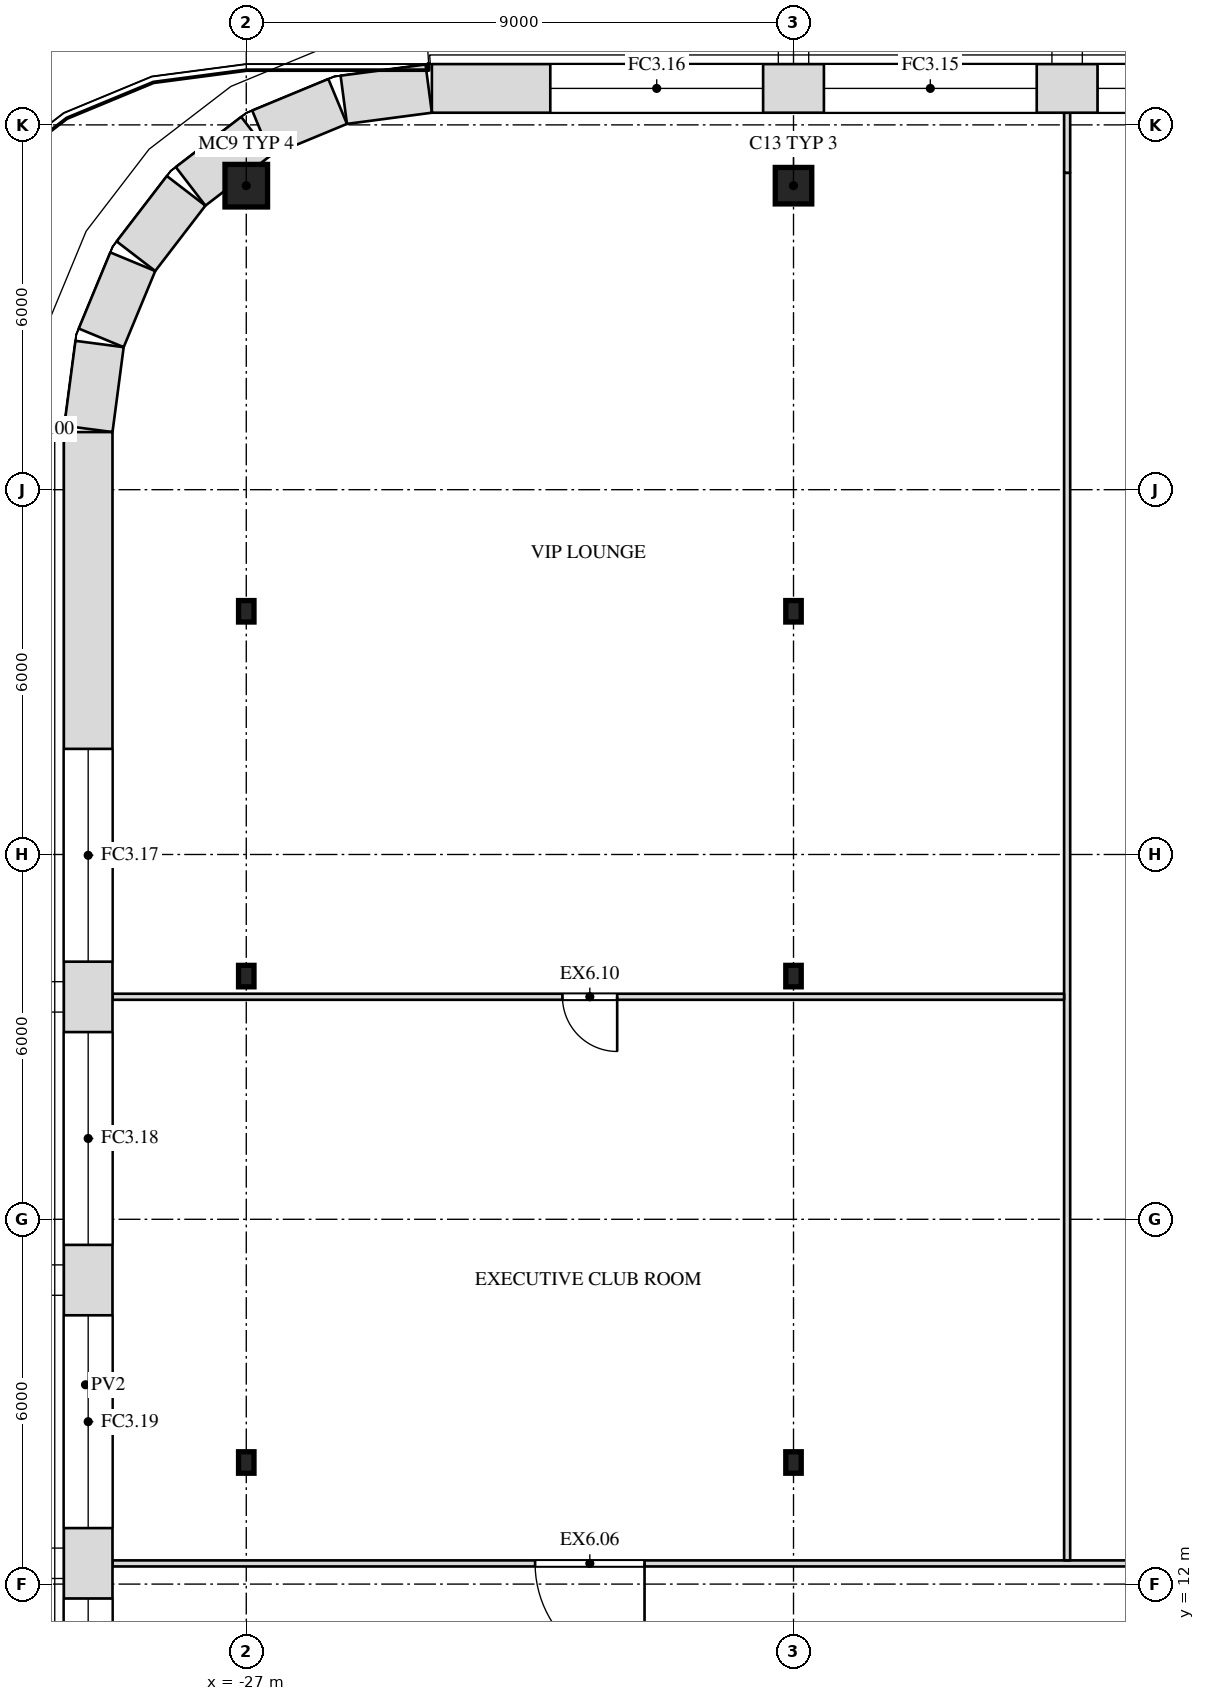
"""IFC4 building model, lengths in metres.
Left out: names, types, materials, properties, quantities, classifications, styles, units other than length and angle.
Written with IfcOpenShell. Run it as: python <this file> out.ifc"""

import sys

from ifc_helpers import new_model, si_unit, direction, frame, frame_2d, origin, origin_2d, place, context, subcontext, project, spatial, rectangle, i_section, extrude, element, fill, save


model = new_model("IFC4")
c1 = context("Model", 3, precision=1e-05, world=origin(), true_north=direction((0.0, 1.0)))
c2 = subcontext(c1, "Body", "Model", "MODEL_VIEW")
j1 = project(units=[si_unit("LENGTHUNIT", "METRE"), si_unit("PLANEANGLEUNIT", "RADIAN")], contexts=[c1])
p1 = place(None, origin())
s1 = spatial("IfcSite", under=j1, at=p1, CompositionType="ELEMENT")
p2 = place(p1, origin())
s2 = spatial("IfcBuilding", under=s1, at=p2, CompositionType="ELEMENT")
p3 = place(p2, frame((0.0, 0.0, 292.5)))
s3 = spatial("IfcBuildingStorey", under=s2, at=p3, CompositionType="ELEMENT", Elevation=292.5)
for number, where, z_axis, x_axis in (
    (1, (-27.0, 14.0, 0.0), (0.0, 0.0, 1.0), (1.0, 0.0, 0.0)),
    (2, (-18.0, 14.0, 0.0), (0.0, 0.0, 1.0), (1.0, 0.0, 0.0)),
    (3, (-27.0, 22.0, 0.0), (0.0, 0.0, 1.0), (1.0, 0.0, 0.0)),
    (4, (-18.0, 22.0, 0.0), (0.0, 0.0, 1.0), (1.0, 0.0, 0.0)),
    (5, (-27.0, 28.0, 0.0), (0.0, 0.0, 1.0), (1.0, 0.0, 0.0)),
    (6, (-18.0, 28.0, 0.0), (0.0, 0.0, 1.0), (1.0, 0.0, 0.0)),
):
    element("IfcColumn", number, at=place(p3, frame(where, z_axis=z_axis, x_axis=x_axis)), inside=s3, PredefinedType="COLUMN", context=c2, shape_type="SweptSolid", body=[
        extrude(i_section(OverallWidth=0.254, OverallDepth=0.353, WebThickness=0.01, FlangeThickness=0.016, at=origin_2d()), origin(), (0.0, 0.0, 1.0), 4.0),
    ])
p4 = place(p3, frame((-27.0, 35.0, 0.0), z_axis=(0.0, 0.0, 1.0), x_axis=(1.0, 0.0, 0.0)))
e7 = element("IfcColumn", 7, at=p4, inside=s3, PredefinedType="COLUMN", context=c2, shape_type="SweptSolid", body=[
    extrude(rectangle(XDim=0.7, YDim=0.7, at=origin_2d()), origin(), (0.0, 0.0, 1.0), 4.0),
])
p5 = place(p3, frame((-18.0, 35.0, 0.0), z_axis=(0.0, 0.0, 1.0), x_axis=(1.0, 0.0, 0.0)))
e8 = element("IfcColumn", 8, at=p5, inside=s3, PredefinedType="COLUMN", context=c2, shape_type="SweptSolid", body=[
    extrude(rectangle(XDim=0.6, YDim=0.6, at=origin_2d()), origin(), (0.0, 0.0, 1.0), 4.0),
])
p6 = place(p3, frame((-29.2, 12.34, 0.0), z_axis=(0.0, 0.0, 1.0), x_axis=(1.0, 0.0, 0.0)))
e9 = element("IfcWall", 9, at=p6, inside=s3, PredefinedType="PARTITIONING", context=c2, shape_type="SweptSolid", body=[
    extrude(rectangle(XDim=58.4, YDim=0.1, at=frame_2d((29.2, 0.0))), origin(), (0.0, 0.0, 1.0), 3.6),
])
p7 = place(p6, frame((6.95, 0.0, 0.0)))
e10 = element("IfcOpeningElement", 10, at=p7, cuts=e9, PredefinedType="OPENING", context=c2, shape_type="SweptSolid", body=[
    extrude(rectangle(XDim=1.8, YDim=2.1, at=frame_2d((0.9, 1.05))), frame((0.0, 0.062, 0.0), z_axis=(0.0, -1.0, 0.0), x_axis=(1.0, 0.0, 0.0)), (0.0, 0.0, 1.0), 0.124),
])
p8 = place(p6, frame((24.2, 0.0, 0.0)))
e11 = element("IfcOpeningElement", 11, at=p8, cuts=e9, PredefinedType="OPENING", context=c2, shape_type="SweptSolid", body=[
    extrude(rectangle(XDim=2.0, YDim=2.4, at=frame_2d((1.0, 1.2))), frame((0.0, 0.062, 0.0), z_axis=(0.0, -1.0, 0.0), x_axis=(1.0, 0.0, 0.0)), (0.0, 0.0, 1.0), 0.124),
])
p9 = place(p6, frame((32.2, 0.0, 0.0)))
e12 = element("IfcOpeningElement", 12, at=p9, cuts=e9, PredefinedType="OPENING", context=c2, shape_type="SweptSolid", body=[
    extrude(rectangle(XDim=2.0, YDim=2.4, at=frame_2d((1.0, 1.2))), frame((0.0, 0.062, 0.0), z_axis=(0.0, -1.0, 0.0), x_axis=(1.0, 0.0, 0.0)), (0.0, 0.0, 1.0), 0.124),
])
p10 = place(p6, frame((49.55, 0.0, 0.0)))
e13 = element("IfcOpeningElement", 13, at=p10, cuts=e9, PredefinedType="OPENING", context=c2, shape_type="SweptSolid", body=[
    extrude(rectangle(XDim=2.0, YDim=2.4, at=frame_2d((1.0, 1.2))), frame((0.0, 0.062, 0.0), z_axis=(0.0, -1.0, 0.0), x_axis=(1.0, 0.0, 0.0)), (0.0, 0.0, 1.0), 0.124),
])
p11 = place(p3, frame((-13.5, 12.39, 0.0), z_axis=(0.0, 0.0, 1.0), x_axis=(0.0, 1.0, 0.0)))
e14 = element("IfcWall", 14, at=p11, inside=s3, PredefinedType="PARTITIONING", context=c2, shape_type="SweptSolid", body=[
    extrude(rectangle(XDim=22.822, YDim=0.1, at=frame_2d((11.411, 0.0))), origin(), (0.0, 0.0, 1.0), 2.988),
])
p12 = place(p3, frame((-13.5, 35.212, 0.0), z_axis=(0.0, 0.0, 1.0), x_axis=(0.0, 1.0, 0.0)))
e15 = element("IfcWall", 15, at=p12, inside=s3, PredefinedType="PARTITIONING", context=c2, shape_type="SweptSolid", body=[
    extrude(rectangle(XDim=0.988, YDim=0.1, at=frame_2d((0.494, 0.0))), origin(), (0.0, 0.0, 1.0), 3.6),
])
p13 = place(p3, frame((-29.2, 21.66, 0.0), z_axis=(0.0, 0.0, 1.0), x_axis=(1.0, 0.0, 0.0)))
e16 = element("IfcWall", 16, at=p13, inside=s3, PredefinedType="PARTITIONING", context=c2, shape_type="SweptSolid", body=[
    extrude(rectangle(XDim=15.65, YDim=0.1, at=frame_2d((7.825, 0.0))), origin(), (0.0, 0.0, 1.0), 3.6),
])
p14 = place(p13, frame((7.4, 0.0, 0.0)))
e17 = element("IfcOpeningElement", 17, at=p14, cuts=e16, PredefinedType="OPENING", context=c2, shape_type="SweptSolid", body=[
    extrude(rectangle(XDim=0.9, YDim=2.1, at=frame_2d((0.45, 1.05))), frame((0.0, 0.062, 0.0), z_axis=(0.0, -1.0, 0.0), x_axis=(1.0, 0.0, 0.0)), (0.0, 0.0, 1.0), 0.124),
])
p15 = place(p3, frame((23.948, 36.6, 0.0), z_axis=(0.0, 0.0, 1.0), x_axis=(-1.0, 0.0, 0.0)))
e18 = element("IfcWall", 18, at=p15, inside=s3, PredefinedType="SOLIDWALL", context=c2, shape_type="SweptSolid", body=[
    extrude(rectangle(XDim=47.895, YDim=0.8, at=frame_2d((23.948, 0.0))), origin(), (0.0, 0.0, 1.0), 3.6),
])
p16 = place(p15, frame((1.948, 0.0, 1.0)))
e19 = element("IfcOpeningElement", 19, at=p16, cuts=e18, PredefinedType="OPENING", context=c2, shape_type="SweptSolid", body=[
    extrude(rectangle(XDim=3.5, YDim=2.3, at=frame_2d((1.75, 1.15))), frame((0.0, 0.412, 0.0), z_axis=(0.0, -1.0, 0.0), x_axis=(1.0, 0.0, 0.0)), (0.0, 0.0, 1.0), 0.824),
])
p17 = place(p15, frame((6.448, 0.0, 1.0)))
e20 = element("IfcOpeningElement", 20, at=p17, cuts=e18, PredefinedType="OPENING", context=c2, shape_type="SweptSolid", body=[
    extrude(rectangle(XDim=3.5, YDim=2.3, at=frame_2d((1.75, 1.15))), frame((0.0, 0.412, 0.0), z_axis=(0.0, -1.0, 0.0), x_axis=(1.0, 0.0, 0.0)), (0.0, 0.0, 1.0), 0.824),
])
p18 = place(p15, frame((10.948, 0.0, 1.0)))
e21 = element("IfcOpeningElement", 21, at=p18, cuts=e18, PredefinedType="OPENING", context=c2, shape_type="SweptSolid", body=[
    extrude(rectangle(XDim=3.5, YDim=2.3, at=frame_2d((1.75, 1.15))), frame((0.0, 0.412, 0.0), z_axis=(0.0, -1.0, 0.0), x_axis=(1.0, 0.0, 0.0)), (0.0, 0.0, 1.0), 0.824),
])
p19 = place(p15, frame((15.448, 0.0, 1.0)))
e22 = element("IfcOpeningElement", 22, at=p19, cuts=e18, PredefinedType="OPENING", context=c2, shape_type="SweptSolid", body=[
    extrude(rectangle(XDim=3.5, YDim=2.3, at=frame_2d((1.75, 1.15))), frame((0.0, 0.412, 0.0), z_axis=(0.0, -1.0, 0.0), x_axis=(1.0, 0.0, 0.0)), (0.0, 0.0, 1.0), 0.824),
])
p20 = place(p15, frame((19.948, 0.0, 1.0)))
e23 = element("IfcOpeningElement", 23, at=p20, cuts=e18, PredefinedType="OPENING", context=c2, shape_type="SweptSolid", body=[
    extrude(rectangle(XDim=3.5, YDim=2.3, at=frame_2d((1.75, 1.15))), frame((0.0, 0.412, 0.0), z_axis=(0.0, -1.0, 0.0), x_axis=(1.0, 0.0, 0.0)), (0.0, 0.0, 1.0), 0.824),
])
p21 = place(p15, frame((24.448, 0.0, 1.0)))
e24 = element("IfcOpeningElement", 24, at=p21, cuts=e18, PredefinedType="OPENING", context=c2, shape_type="SweptSolid", body=[
    extrude(rectangle(XDim=3.5, YDim=2.3, at=frame_2d((1.75, 1.15))), frame((0.0, 0.412, 0.0), z_axis=(0.0, -1.0, 0.0), x_axis=(1.0, 0.0, 0.0)), (0.0, 0.0, 1.0), 0.824),
])
p22 = place(p15, frame((28.948, 0.0, 1.0)))
e25 = element("IfcOpeningElement", 25, at=p22, cuts=e18, PredefinedType="OPENING", context=c2, shape_type="SweptSolid", body=[
    extrude(rectangle(XDim=3.5, YDim=2.3, at=frame_2d((1.75, 1.15))), frame((0.0, 0.412, 0.0), z_axis=(0.0, -1.0, 0.0), x_axis=(1.0, 0.0, 0.0)), (0.0, 0.0, 1.0), 0.824),
])
p23 = place(p15, frame((33.448, 0.0, 1.0)))
e26 = element("IfcOpeningElement", 26, at=p23, cuts=e18, PredefinedType="OPENING", context=c2, shape_type="SweptSolid", body=[
    extrude(rectangle(XDim=3.5, YDim=2.3, at=frame_2d((1.75, 1.15))), frame((0.0, 0.412, 0.0), z_axis=(0.0, -1.0, 0.0), x_axis=(1.0, 0.0, 0.0)), (0.0, 0.0, 1.0), 0.824),
])
p24 = place(p15, frame((37.948, 0.0, 1.0)))
e27 = element("IfcOpeningElement", 27, at=p24, cuts=e18, PredefinedType="OPENING", context=c2, shape_type="SweptSolid", body=[
    extrude(rectangle(XDim=3.5, YDim=2.3, at=frame_2d((1.75, 1.15))), frame((0.0, 0.412, 0.0), z_axis=(0.0, -1.0, 0.0), x_axis=(1.0, 0.0, 0.0)), (0.0, 0.0, 1.0), 0.824),
])
p25 = place(p15, frame((42.448, 0.0, 1.0)))
e28 = element("IfcOpeningElement", 28, at=p25, cuts=e18, PredefinedType="OPENING", context=c2, shape_type="SweptSolid", body=[
    extrude(rectangle(XDim=3.5, YDim=2.3, at=frame_2d((1.75, 1.15))), frame((0.0, 0.412, 0.0), z_axis=(0.0, -1.0, 0.0), x_axis=(1.0, 0.0, 0.0)), (0.0, 0.0, 1.0), 0.824),
])
p26 = place(p3, frame((-24.0, 36.597, 0.0), z_axis=(0.0, 0.0, 1.0), x_axis=(-0.99144603414, -0.130517283865, 0.0)))
e29 = element("IfcWall", 29, at=p26, inside=s3, PredefinedType="SOLIDWALL", context=c2, shape_type="SweptSolid", body=[
    extrude(rectangle(XDim=1.408, YDim=0.8, at=frame_2d((0.704, 0.0))), origin(), (0.0, 0.0, 1.0), 3.6),
])
p27 = place(p3, frame((-25.497, 36.386, 0.0), z_axis=(0.0, 0.0, 1.0), x_axis=(-0.923847774587, -0.38276009378, 0.0)))
e30 = element("IfcWall", 30, at=p27, inside=s3, PredefinedType="SOLIDWALL", context=c2, shape_type="SweptSolid", body=[
    extrude(rectangle(XDim=1.355, YDim=0.8, at=frame_2d((0.678, 0.0))), origin(), (0.0, 0.0, 1.0), 3.6),
])
for number, where, z_axis, x_axis in (
    (31, (-26.84, 35.815, 0.0), (0.0, 0.0, 1.0), (-0.793, -0.609, 0.0)),
    (32, (-27.989, 34.916, 0.0), (0.0, 0.0, 1.0), (-0.609, -0.793, 0.0)),
):
    element("IfcWall", number, at=place(p3, frame(where, z_axis=z_axis, x_axis=x_axis)), inside=s3, PredefinedType="SOLIDWALL", context=c2, shape_type="SweptSolid", body=[
        extrude(rectangle(XDim=1.356, YDim=0.8, at=frame_2d((0.678, 0.0))), origin(), (0.0, 0.0, 1.0), 3.6),
    ])
p28 = place(p3, frame((-28.867, 33.75, 0.0), z_axis=(0.0, 0.0, 1.0), x_axis=(-0.38276009378, -0.923847774587, 0.0)))
e33 = element("IfcWall", 33, at=p28, inside=s3, PredefinedType="SOLIDWALL", context=c2, shape_type="SweptSolid", body=[
    extrude(rectangle(XDim=1.355, YDim=0.8, at=frame_2d((0.678, 0.0))), origin(), (0.0, 0.0, 1.0), 3.6),
])
p29 = place(p3, frame((-29.413, 32.396, 0.0), z_axis=(0.0, 0.0, 1.0), x_axis=(-0.130517283865, -0.99144603414, 0.0)))
e34 = element("IfcWall", 34, at=p29, inside=s3, PredefinedType="SOLIDWALL", context=c2, shape_type="SweptSolid", body=[
    extrude(rectangle(XDim=1.408, YDim=0.8, at=frame_2d((0.704, 0.0))), origin(), (0.0, 0.0, 1.0), 3.6),
])
p30 = place(p3, frame((-29.6, 30.948, 0.0), z_axis=(0.0, 0.0, 1.0), x_axis=(0.0, -1.0, 0.0)))
e35 = element("IfcWall", 35, at=p30, inside=s3, PredefinedType="SOLIDWALL", context=c2, shape_type="SweptSolid", body=[
    extrude(rectangle(XDim=41.842, YDim=0.8, at=frame_2d((20.921, 0.0))), origin(), (0.0, 0.0, 1.0), 3.6),
])
p31 = place(p30, frame((5.211, 0.0, 1.0)))
e36 = element("IfcOpeningElement", 36, at=p31, cuts=e35, PredefinedType="OPENING", context=c2, shape_type="SweptSolid", body=[
    extrude(rectangle(XDim=3.5, YDim=2.3, at=frame_2d((1.75, 1.15))), frame((0.0, 0.412, 0.0), z_axis=(0.0, -1.0, 0.0), x_axis=(1.0, 0.0, 0.0)), (0.0, 0.0, 1.0), 0.824),
])
p32 = place(p30, frame((9.868, 0.0, 1.0)))
e37 = element("IfcOpeningElement", 37, at=p32, cuts=e35, PredefinedType="OPENING", context=c2, shape_type="SweptSolid", body=[
    extrude(rectangle(XDim=3.5, YDim=2.3, at=frame_2d((1.75, 1.15))), frame((0.0, 0.412, 0.0), z_axis=(0.0, -1.0, 0.0), x_axis=(1.0, 0.0, 0.0)), (0.0, 0.0, 1.0), 0.824),
])
p33 = place(p30, frame((14.527, 0.0, 1.0)))
e38 = element("IfcOpeningElement", 38, at=p33, cuts=e35, PredefinedType="OPENING", context=c2, shape_type="SweptSolid", body=[
    extrude(rectangle(XDim=3.5, YDim=2.3, at=frame_2d((1.75, 1.15))), frame((0.0, 0.412, 0.0), z_axis=(0.0, -1.0, 0.0), x_axis=(1.0, 0.0, 0.0)), (0.0, 0.0, 1.0), 0.824),
])
p34 = place(p30, frame((19.184, 0.0, 1.0)))
e39 = element("IfcOpeningElement", 39, at=p34, cuts=e35, PredefinedType="OPENING", context=c2, shape_type="SweptSolid", body=[
    extrude(rectangle(XDim=3.5, YDim=2.3, at=frame_2d((1.75, 1.15))), frame((0.0, 0.412, 0.0), z_axis=(0.0, -1.0, 0.0), x_axis=(1.0, 0.0, 0.0)), (0.0, 0.0, 1.0), 0.824),
])
p35 = place(p30, frame((28.5, 0.0, 1.0)))
e40 = element("IfcOpeningElement", 40, at=p35, cuts=e35, PredefinedType="OPENING", context=c2, shape_type="SweptSolid", body=[
    extrude(rectangle(XDim=3.5, YDim=2.3, at=frame_2d((1.75, 1.15))), frame((0.0, 0.412, 0.0), z_axis=(0.0, -1.0, 0.0), x_axis=(1.0, 0.0, 0.0)), (0.0, 0.0, 1.0), 0.824),
])
p36 = place(p30, frame((33.158, 0.0, 1.0)))
e41 = element("IfcOpeningElement", 41, at=p36, cuts=e35, PredefinedType="OPENING", context=c2, shape_type="SweptSolid", body=[
    extrude(rectangle(XDim=3.5, YDim=2.3, at=frame_2d((1.75, 1.15))), frame((0.0, 0.412, 0.0), z_axis=(0.0, -1.0, 0.0), x_axis=(1.0, 0.0, 0.0)), (0.0, 0.0, 1.0), 0.824),
])
p37 = place(p30, frame((23.763, 0.0, 0.0)))
e42 = element("IfcOpeningElement", 42, at=p37, cuts=e35, PredefinedType="OPENING", context=c2, shape_type="SweptSolid", body=[
    extrude(rectangle(XDim=1.8, YDim=2.4, at=frame_2d((0.9, 1.2))), frame((0.0, 0.412, 0.0), z_axis=(0.0, -1.0, 0.0), x_axis=(1.0, 0.0, 0.0)), (0.0, 0.0, 1.0), 0.824),
])
p38 = place(p7, origin())
e43 = element("IfcDoor", 43, at=p38, inside=s3, OperationType="DOUBLE_DOOR_SINGLE_SWING", PredefinedType="DOOR", context=c2, shape_type="SweptSolid", body=[
    extrude(rectangle(XDim=1.8, YDim=2.1, at=frame_2d((0.9, 1.05))), frame((0.0, 0.025, 0.0), z_axis=(0.0, -1.0, 0.0), x_axis=(1.0, 0.0, 0.0)), (0.0, 0.0, 1.0), 0.05),
])
fill(e10, e43)
p39 = place(p14, origin())
e44 = element("IfcDoor", 44, at=p39, inside=s3, OperationType="SINGLE_SWING_LEFT", PredefinedType="DOOR", context=c2, shape_type="SweptSolid", body=[
    extrude(rectangle(XDim=0.9, YDim=2.1, at=frame_2d((0.45, 1.05))), frame((0.0, 0.025, 0.0), z_axis=(0.0, -1.0, 0.0), x_axis=(1.0, 0.0, 0.0)), (0.0, 0.0, 1.0), 0.05),
])
fill(e17, e44)
p40 = place(p23, origin())
e45 = element("IfcWindow", 45, at=p40, inside=s3, PartitioningType="SINGLE_PANEL", PredefinedType="WINDOW", context=c2, shape_type="SweptSolid", body=[
    extrude(rectangle(XDim=3.5, YDim=2.3, at=frame_2d((1.75, 1.15))), frame((0.0, 0.03, 0.0), z_axis=(0.0, -1.0, 0.0), x_axis=(1.0, 0.0, 0.0)), (0.0, 0.0, 1.0), 0.06),
])
fill(e26, e45)
p41 = place(p24, origin())
e46 = element("IfcWindow", 46, at=p41, inside=s3, PartitioningType="SINGLE_PANEL", PredefinedType="WINDOW", context=c2, shape_type="SweptSolid", body=[
    extrude(rectangle(XDim=3.5, YDim=2.3, at=frame_2d((1.75, 1.15))), frame((0.0, 0.03, 0.0), z_axis=(0.0, -1.0, 0.0), x_axis=(1.0, 0.0, 0.0)), (0.0, 0.0, 1.0), 0.06),
])
fill(e27, e46)
p42 = place(p25, origin())
e47 = element("IfcWindow", 47, at=p42, inside=s3, PartitioningType="SINGLE_PANEL", PredefinedType="WINDOW", context=c2, shape_type="SweptSolid", body=[
    extrude(rectangle(XDim=3.5, YDim=2.3, at=frame_2d((1.75, 1.15))), frame((0.0, 0.03, 0.0), z_axis=(0.0, -1.0, 0.0), x_axis=(1.0, 0.0, 0.0)), (0.0, 0.0, 1.0), 0.06),
])
fill(e28, e47)
p43 = place(p31, origin())
e48 = element("IfcWindow", 48, at=p43, inside=s3, PartitioningType="SINGLE_PANEL", PredefinedType="WINDOW", context=c2, shape_type="SweptSolid", body=[
    extrude(rectangle(XDim=3.5, YDim=2.3, at=frame_2d((1.75, 1.15))), frame((0.0, 0.03, 0.0), z_axis=(0.0, -1.0, 0.0), x_axis=(1.0, 0.0, 0.0)), (0.0, 0.0, 1.0), 0.06),
])
fill(e36, e48)
p44 = place(p32, origin())
e49 = element("IfcWindow", 49, at=p44, inside=s3, PartitioningType="SINGLE_PANEL", PredefinedType="WINDOW", context=c2, shape_type="SweptSolid", body=[
    extrude(rectangle(XDim=3.5, YDim=2.3, at=frame_2d((1.75, 1.15))), frame((0.0, 0.03, 0.0), z_axis=(0.0, -1.0, 0.0), x_axis=(1.0, 0.0, 0.0)), (0.0, 0.0, 1.0), 0.06),
])
fill(e37, e49)
p45 = place(p33, origin())
e50 = element("IfcWindow", 50, at=p45, inside=s3, PartitioningType="SINGLE_PANEL", PredefinedType="WINDOW", context=c2, shape_type="SweptSolid", body=[
    extrude(rectangle(XDim=3.5, YDim=2.3, at=frame_2d((1.75, 1.15))), frame((0.0, 0.03, 0.0), z_axis=(0.0, -1.0, 0.0), x_axis=(1.0, 0.0, 0.0)), (0.0, 0.0, 1.0), 0.06),
])
fill(e38, e50)
p46 = place(p34, origin())
e51 = element("IfcWindow", 51, at=p46, inside=s3, PartitioningType="SINGLE_PANEL", PredefinedType="WINDOW", context=c2, shape_type="SweptSolid", body=[
    extrude(rectangle(XDim=3.5, YDim=2.3, at=frame_2d((1.75, 1.15))), frame((0.0, 0.03, 0.0), z_axis=(0.0, -1.0, 0.0), x_axis=(1.0, 0.0, 0.0)), (0.0, 0.0, 1.0), 0.06),
])
fill(e39, e51)
save(model, sys.argv[1])
